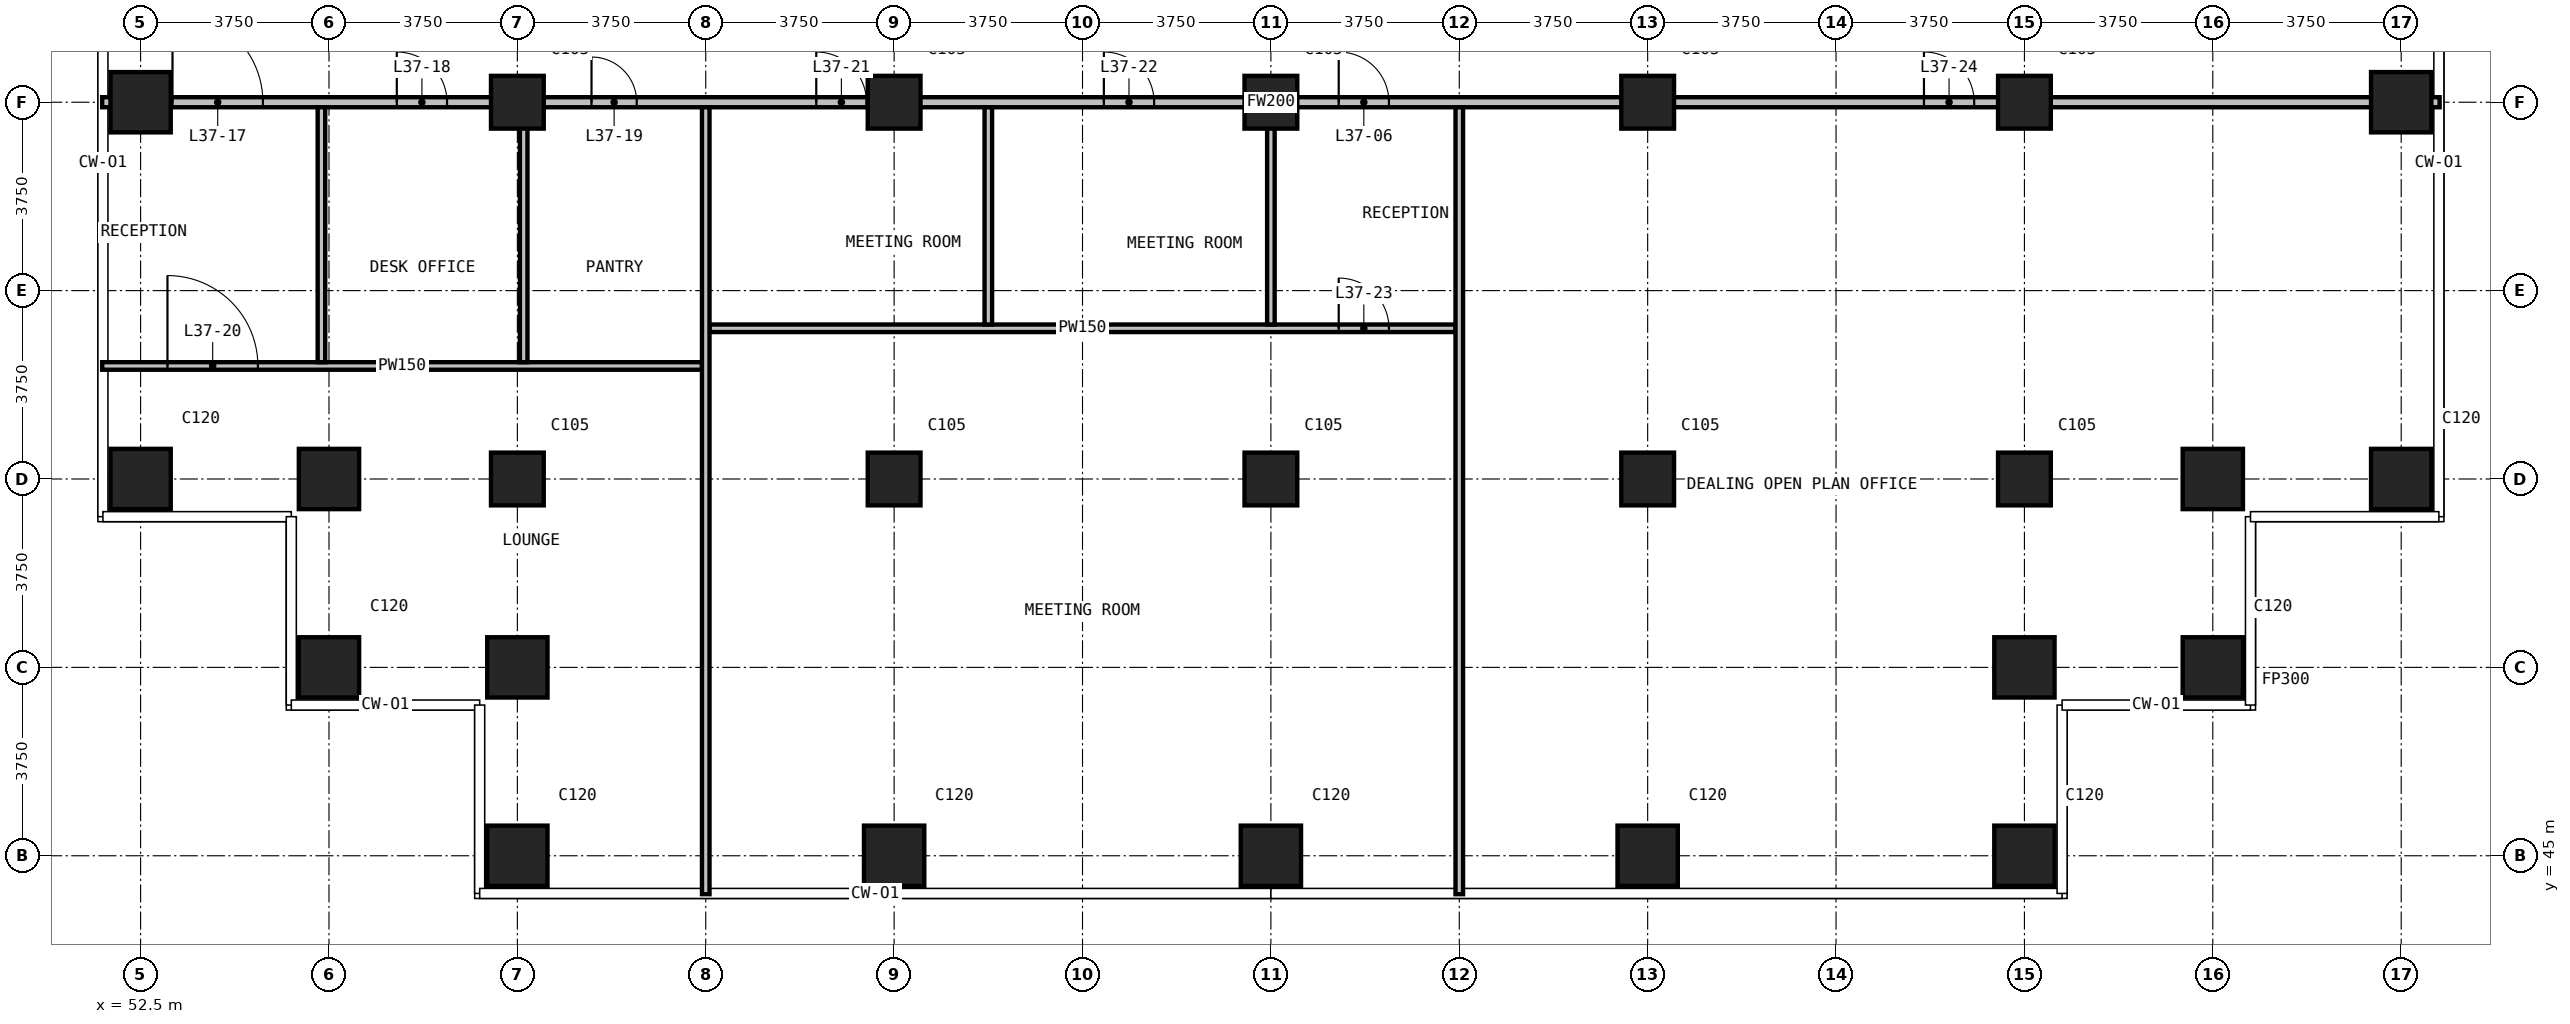
"""IFC4 building model, lengths in metres.
Left out: names, types, materials, properties, quantities, classifications, styles, units other than length and angle.
Written with IfcOpenShell. Run it as: python <this file> out.ifc"""

import sys

from ifc_helpers import new_model, si_unit, direction, frame, frame_2d, origin, origin_2d, place, context, subcontext, project, spatial, rectangle, extrude, element, fill, save


model = new_model("IFC4")
c1 = context("Model", 3, precision=1e-05, world=origin(), true_north=direction((0.0, 1.0)))
c2 = subcontext(c1, "Body", "Model", "MODEL_VIEW")
j1 = project(units=[si_unit("LENGTHUNIT", "METRE"), si_unit("PLANEANGLEUNIT", "RADIAN")], contexts=[c1])
p1 = place(None, origin())
s1 = spatial("IfcSite", under=j1, at=p1, CompositionType="ELEMENT")
p2 = place(p1, origin())
s2 = spatial("IfcBuilding", under=s1, at=p2, CompositionType="ELEMENT")
p3 = place(p2, frame((0.0, 0.0, 147.7)))
s3 = spatial("IfcBuildingStorey", under=s2, at=p3, CompositionType="ELEMENT", Elevation=147.7)
for number, where, z_axis, x_axis in (
    (1, (52.5, 52.5, 0.0), (0.0, 0.0, 1.0), (1.0, 0.0, 0.0)),
    (2, (52.5, 60.0, 0.0), (0.0, 0.0, 1.0), (1.0, 0.0, 0.0)),
    (3, (56.25, 48.75, 0.0), (0.0, 0.0, 1.0), (1.0, 0.0, 0.0)),
    (4, (56.25, 52.5, 0.0), (0.0, 0.0, 1.0), (1.0, 0.0, 0.0)),
    (5, (60.0, 45.0, 0.0), (0.0, 0.0, 1.0), (1.0, 0.0, 0.0)),
    (6, (60.0, 48.75, 0.0), (0.0, 0.0, 1.0), (1.0, 0.0, 0.0)),
):
    element("IfcColumn", number, at=place(p3, frame(where, z_axis=z_axis, x_axis=x_axis)), inside=s3, PredefinedType="COLUMN", context=c2, shape_type="SweptSolid", body=[
        extrude(rectangle(XDim=1.2, YDim=1.2, at=origin_2d()), origin(), (0.0, 0.0, 1.0), 3.6),
    ])
for number, where, z_axis, x_axis in (
    (7, (60.0, 52.5, 0.0), (0.0, 0.0, 1.0), (1.0, 0.0, 0.0)),
    (8, (60.0, 60.0, 0.0), (0.0, 0.0, 1.0), (1.0, 0.0, 0.0)),
):
    element("IfcColumn", number, at=place(p3, frame(where, z_axis=z_axis, x_axis=x_axis)), inside=s3, PredefinedType="COLUMN", context=c2, shape_type="SweptSolid", body=[
        extrude(rectangle(XDim=1.05, YDim=1.05, at=origin_2d()), origin(), (0.0, 0.0, 1.0), 3.6),
    ])
p4 = place(p3, frame((67.5, 45.0, 0.0), z_axis=(0.0, 0.0, 1.0), x_axis=(1.0, 0.0, 0.0)))
e9 = element("IfcColumn", 9, at=p4, inside=s3, PredefinedType="COLUMN", context=c2, shape_type="SweptSolid", body=[
    extrude(rectangle(XDim=1.2, YDim=1.2, at=origin_2d()), origin(), (0.0, 0.0, 1.0), 3.6),
])
for number, where, z_axis, x_axis in (
    (10, (67.5, 52.5, 0.0), (0.0, 0.0, 1.0), (1.0, 0.0, 0.0)),
    (11, (67.5, 60.0, 0.0), (0.0, 0.0, 1.0), (1.0, 0.0, 0.0)),
):
    element("IfcColumn", number, at=place(p3, frame(where, z_axis=z_axis, x_axis=x_axis)), inside=s3, PredefinedType="COLUMN", context=c2, shape_type="SweptSolid", body=[
        extrude(rectangle(XDim=1.05, YDim=1.05, at=origin_2d()), origin(), (0.0, 0.0, 1.0), 3.6),
    ])
p5 = place(p3, frame((75.0, 45.0, 0.0), z_axis=(0.0, 0.0, 1.0), x_axis=(1.0, 0.0, 0.0)))
e12 = element("IfcColumn", 12, at=p5, inside=s3, PredefinedType="COLUMN", context=c2, shape_type="SweptSolid", body=[
    extrude(rectangle(XDim=1.2, YDim=1.2, at=origin_2d()), origin(), (0.0, 0.0, 1.0), 3.6),
])
for number, where, z_axis, x_axis in (
    (13, (75.0, 52.5, 0.0), (0.0, 0.0, 1.0), (1.0, 0.0, 0.0)),
    (14, (75.0, 60.0, 0.0), (0.0, 0.0, 1.0), (1.0, 0.0, 0.0)),
):
    element("IfcColumn", number, at=place(p3, frame(where, z_axis=z_axis, x_axis=x_axis)), inside=s3, PredefinedType="COLUMN", context=c2, shape_type="SweptSolid", body=[
        extrude(rectangle(XDim=1.05, YDim=1.05, at=origin_2d()), origin(), (0.0, 0.0, 1.0), 3.6),
    ])
p6 = place(p3, frame((82.5, 45.0, 0.0), z_axis=(0.0, 0.0, 1.0), x_axis=(1.0, 0.0, 0.0)))
e15 = element("IfcColumn", 15, at=p6, inside=s3, PredefinedType="COLUMN", context=c2, shape_type="SweptSolid", body=[
    extrude(rectangle(XDim=1.2, YDim=1.2, at=origin_2d()), origin(), (0.0, 0.0, 1.0), 3.6),
])
for number, where, z_axis, x_axis in (
    (16, (82.5, 52.5, 0.0), (0.0, 0.0, 1.0), (1.0, 0.0, 0.0)),
    (17, (82.5, 60.0, 0.0), (0.0, 0.0, 1.0), (1.0, 0.0, 0.0)),
):
    element("IfcColumn", number, at=place(p3, frame(where, z_axis=z_axis, x_axis=x_axis)), inside=s3, PredefinedType="COLUMN", context=c2, shape_type="SweptSolid", body=[
        extrude(rectangle(XDim=1.05, YDim=1.05, at=origin_2d()), origin(), (0.0, 0.0, 1.0), 3.6),
    ])
for number, where, z_axis, x_axis in (
    (18, (90.0, 45.0, 0.0), (0.0, 0.0, 1.0), (1.0, 0.0, 0.0)),
    (19, (90.0, 48.75, 0.0), (0.0, 0.0, 1.0), (1.0, 0.0, 0.0)),
):
    element("IfcColumn", number, at=place(p3, frame(where, z_axis=z_axis, x_axis=x_axis)), inside=s3, PredefinedType="COLUMN", context=c2, shape_type="SweptSolid", body=[
        extrude(rectangle(XDim=1.2, YDim=1.2, at=origin_2d()), origin(), (0.0, 0.0, 1.0), 3.6),
    ])
for number, where, z_axis, x_axis in (
    (20, (90.0, 52.5, 0.0), (0.0, 0.0, 1.0), (1.0, 0.0, 0.0)),
    (21, (90.0, 60.0, 0.0), (0.0, 0.0, 1.0), (1.0, 0.0, 0.0)),
):
    element("IfcColumn", number, at=place(p3, frame(where, z_axis=z_axis, x_axis=x_axis)), inside=s3, PredefinedType="COLUMN", context=c2, shape_type="SweptSolid", body=[
        extrude(rectangle(XDim=1.05, YDim=1.05, at=origin_2d()), origin(), (0.0, 0.0, 1.0), 3.6),
    ])
for number, where, z_axis, x_axis in (
    (22, (93.75, 48.75, 0.0), (0.0, 0.0, 1.0), (1.0, 0.0, 0.0)),
    (23, (93.75, 52.5, 0.0), (0.0, 0.0, 1.0), (1.0, 0.0, 0.0)),
    (24, (97.5, 52.5, 0.0), (0.0, 0.0, 1.0), (1.0, 0.0, 0.0)),
    (25, (97.5, 60.0, 0.0), (0.0, 0.0, 1.0), (1.0, 0.0, 0.0)),
):
    element("IfcColumn", number, at=place(p3, frame(where, z_axis=z_axis, x_axis=x_axis)), inside=s3, PredefinedType="COLUMN", context=c2, shape_type="SweptSolid", body=[
        extrude(rectangle(XDim=1.2, YDim=1.2, at=origin_2d()), origin(), (0.0, 0.0, 1.0), 3.6),
    ])
p7 = place(p3, frame((51.735, 60.0, 0.0), z_axis=(0.0, 0.0, 1.0), x_axis=(1.0, 0.0, 0.0)))
e26 = element("IfcWall", 26, at=p7, inside=s3, PredefinedType="PARTITIONING", context=c2, shape_type="SweptSolid", body=[
    extrude(rectangle(XDim=46.53, YDim=0.2, at=frame_2d((23.265, 0.0))), origin(), (0.0, 0.0, 1.0), 3.3),
])
p8 = place(p7, frame((24.615, 0.0, 0.0)))
e27 = element("IfcOpeningElement", 27, at=p8, cuts=e26, PredefinedType="OPENING", context=c2, shape_type="SweptSolid", body=[
    extrude(rectangle(XDim=1.0, YDim=2.2, at=frame_2d((0.5, 1.1))), frame((0.0, 0.11, 0.0), z_axis=(0.0, -1.0, 0.0), x_axis=(1.0, 0.0, 0.0)), (0.0, 0.0, 1.0), 0.22),
])
p9 = place(p7, frame((1.4, 0.0, 0.0)))
e28 = element("IfcOpeningElement", 28, at=p9, cuts=e26, PredefinedType="OPENING", context=c2, shape_type="SweptSolid", body=[
    extrude(rectangle(XDim=1.8, YDim=2.2, at=frame_2d((0.9, 1.1))), frame((0.0, 0.11, 0.0), z_axis=(0.0, -1.0, 0.0), x_axis=(1.0, 0.0, 0.0)), (0.0, 0.0, 1.0), 0.22),
])
p10 = place(p7, frame((5.865, 0.0, 0.0)))
e29 = element("IfcOpeningElement", 29, at=p10, cuts=e26, PredefinedType="OPENING", context=c2, shape_type="SweptSolid", body=[
    extrude(rectangle(XDim=1.0, YDim=2.2, at=frame_2d((0.5, 1.1))), frame((0.0, 0.11, 0.0), z_axis=(0.0, -1.0, 0.0), x_axis=(1.0, 0.0, 0.0)), (0.0, 0.0, 1.0), 0.22),
])
p11 = place(p7, frame((9.741, 0.0, 0.0)))
e30 = element("IfcOpeningElement", 30, at=p11, cuts=e26, PredefinedType="OPENING", context=c2, shape_type="SweptSolid", body=[
    extrude(rectangle(XDim=0.9, YDim=2.2, at=frame_2d((0.45, 1.1))), frame((0.0, 0.11, 0.0), z_axis=(0.0, -1.0, 0.0), x_axis=(1.0, 0.0, 0.0)), (0.0, 0.0, 1.0), 0.22),
])
p12 = place(p7, frame((14.215, 0.0, 0.0)))
e31 = element("IfcOpeningElement", 31, at=p12, cuts=e26, PredefinedType="OPENING", context=c2, shape_type="SweptSolid", body=[
    extrude(rectangle(XDim=1.0, YDim=2.2, at=frame_2d((0.5, 1.1))), frame((0.0, 0.11, 0.0), z_axis=(0.0, -1.0, 0.0), x_axis=(1.0, 0.0, 0.0)), (0.0, 0.0, 1.0), 0.22),
])
p13 = place(p7, frame((19.94, 0.0, 0.0)))
e32 = element("IfcOpeningElement", 32, at=p13, cuts=e26, PredefinedType="OPENING", context=c2, shape_type="SweptSolid", body=[
    extrude(rectangle(XDim=1.0, YDim=2.2, at=frame_2d((0.5, 1.1))), frame((0.0, 0.11, 0.0), z_axis=(0.0, -1.0, 0.0), x_axis=(1.0, 0.0, 0.0)), (0.0, 0.0, 1.0), 0.22),
])
p14 = place(p7, frame((36.265, 0.0, 0.0)))
e33 = element("IfcOpeningElement", 33, at=p14, cuts=e26, PredefinedType="OPENING", context=c2, shape_type="SweptSolid", body=[
    extrude(rectangle(XDim=1.0, YDim=2.2, at=frame_2d((0.5, 1.1))), frame((0.0, 0.11, 0.0), z_axis=(0.0, -1.0, 0.0), x_axis=(1.0, 0.0, 0.0)), (0.0, 0.0, 1.0), 0.22),
])
p15 = place(p3, frame((51.735, 54.75, 0.0), z_axis=(0.0, 0.0, 1.0), x_axis=(1.0, 0.0, 0.0)))
e34 = element("IfcWall", 34, at=p15, inside=s3, PredefinedType="PARTITIONING", context=c2, shape_type="SweptSolid", body=[
    extrude(rectangle(XDim=11.94, YDim=0.15, at=frame_2d((5.97, 0.0))), origin(), (0.0, 0.0, 1.0), 3.3),
])
p16 = place(p15, frame((1.3, 0.0, 0.0)))
e35 = element("IfcOpeningElement", 35, at=p16, cuts=e34, PredefinedType="OPENING", context=c2, shape_type="SweptSolid", body=[
    extrude(rectangle(XDim=1.8, YDim=2.2, at=frame_2d((0.9, 1.1))), frame((0.0, 0.085, 0.0), z_axis=(0.0, -1.0, 0.0), x_axis=(1.0, 0.0, 0.0)), (0.0, 0.0, 1.0), 0.17),
])
p17 = place(p3, frame((63.825, 55.5, 0.0), z_axis=(0.0, 0.0, 1.0), x_axis=(1.0, 0.0, 0.0)))
e36 = element("IfcWall", 36, at=p17, inside=s3, PredefinedType="PARTITIONING", context=c2, shape_type="SweptSolid", body=[
    extrude(rectangle(XDim=14.85, YDim=0.15, at=frame_2d((7.425, 0.0))), origin(), (0.0, 0.0, 1.0), 3.3),
])
p18 = place(p17, frame((12.525, 0.0, 0.0)))
e37 = element("IfcOpeningElement", 37, at=p18, cuts=e36, PredefinedType="OPENING", context=c2, shape_type="SweptSolid", body=[
    extrude(rectangle(XDim=1.0, YDim=2.2, at=frame_2d((0.5, 1.1))), frame((0.0, 0.085, 0.0), z_axis=(0.0, -1.0, 0.0), x_axis=(1.0, 0.0, 0.0)), (0.0, 0.0, 1.0), 0.17),
])
for number, where, z_axis, x_axis in (
    (38, (56.1, 54.825, 0.0), (0.0, 0.0, 1.0), (0.0, 1.0, 0.0)),
    (39, (60.126, 54.825, 0.0), (0.0, 0.0, 1.0), (0.0, 1.0, 0.0)),
):
    element("IfcWall", number, at=place(p3, frame(where, z_axis=z_axis, x_axis=x_axis)), inside=s3, PredefinedType="PARTITIONING", context=c2, shape_type="SweptSolid", body=[
        extrude(rectangle(XDim=5.075, YDim=0.15, at=frame_2d((2.538, 0.0))), origin(), (0.0, 0.0, 1.0), 3.3),
    ])
p19 = place(p3, frame((63.75, 44.235, 0.0), z_axis=(0.0, 0.0, 1.0), x_axis=(0.0, 1.0, 0.0)))
e40 = element("IfcWall", 40, at=p19, inside=s3, PredefinedType="PARTITIONING", context=c2, shape_type="SweptSolid", body=[
    extrude(rectangle(XDim=15.665, YDim=0.15, at=frame_2d((7.833, 0.0))), origin(), (0.0, 0.0, 1.0), 3.3),
])
for number, where, z_axis, x_axis in (
    (41, (69.375, 55.575, 0.0), (0.0, 0.0, 1.0), (0.0, 1.0, 0.0)),
    (42, (75.0, 55.575, 0.0), (0.0, 0.0, 1.0), (0.0, 1.0, 0.0)),
):
    element("IfcWall", number, at=place(p3, frame(where, z_axis=z_axis, x_axis=x_axis)), inside=s3, PredefinedType="PARTITIONING", context=c2, shape_type="SweptSolid", body=[
        extrude(rectangle(XDim=4.325, YDim=0.15, at=frame_2d((2.163, 0.0))), origin(), (0.0, 0.0, 1.0), 3.3),
    ])
p20 = place(p3, frame((78.75, 44.235, 0.0), z_axis=(0.0, 0.0, 1.0), x_axis=(0.0, 1.0, 0.0)))
e43 = element("IfcWall", 43, at=p20, inside=s3, PredefinedType="PARTITIONING", context=c2, shape_type="SweptSolid", body=[
    extrude(rectangle(XDim=15.665, YDim=0.15, at=frame_2d((7.833, 0.0))), origin(), (0.0, 0.0, 1.0), 3.3),
])
p21 = place(p8, origin())
e44 = element("IfcDoor", 44, at=p21, inside=s3, OperationType="SINGLE_SWING_RIGHT", PredefinedType="DOOR", context=c2, shape_type="SweptSolid", body=[
    extrude(rectangle(XDim=1.0, YDim=2.2, at=frame_2d((0.5, 1.1))), frame((0.0, 0.025, 0.0), z_axis=(0.0, -1.0, 0.0), x_axis=(1.0, 0.0, 0.0)), (0.0, 0.0, 1.0), 0.05),
])
fill(e27, e44)
p22 = place(p9, origin())
e45 = element("IfcDoor", 45, at=p22, inside=s3, OperationType="DOUBLE_DOOR_SINGLE_SWING", PredefinedType="DOOR", context=c2, shape_type="SweptSolid", body=[
    extrude(rectangle(XDim=1.8, YDim=2.2, at=frame_2d((0.9, 1.1))), frame((0.0, 0.025, 0.0), z_axis=(0.0, -1.0, 0.0), x_axis=(1.0, 0.0, 0.0)), (0.0, 0.0, 1.0), 0.05),
])
fill(e28, e45)
p23 = place(p10, origin())
e46 = element("IfcDoor", 46, at=p23, inside=s3, OperationType="SINGLE_SWING_RIGHT", PredefinedType="DOOR", context=c2, shape_type="SweptSolid", body=[
    extrude(rectangle(XDim=1.0, YDim=2.2, at=frame_2d((0.5, 1.1))), frame((0.0, 0.025, 0.0), z_axis=(0.0, -1.0, 0.0), x_axis=(1.0, 0.0, 0.0)), (0.0, 0.0, 1.0), 0.05),
])
fill(e29, e46)
p24 = place(p11, origin())
e47 = element("IfcDoor", 47, at=p24, inside=s3, OperationType="SINGLE_SWING_RIGHT", PredefinedType="DOOR", context=c2, shape_type="SweptSolid", body=[
    extrude(rectangle(XDim=0.9, YDim=2.2, at=frame_2d((0.45, 1.1))), frame((0.0, 0.025, 0.0), z_axis=(0.0, -1.0, 0.0), x_axis=(1.0, 0.0, 0.0)), (0.0, 0.0, 1.0), 0.05),
])
fill(e30, e47)
p25 = place(p16, origin())
e48 = element("IfcDoor", 48, at=p25, inside=s3, OperationType="DOUBLE_DOOR_SINGLE_SWING", PredefinedType="DOOR", context=c2, shape_type="SweptSolid", body=[
    extrude(rectangle(XDim=1.8, YDim=2.2, at=frame_2d((0.9, 1.1))), frame((0.0, 0.025, 0.0), z_axis=(0.0, -1.0, 0.0), x_axis=(1.0, 0.0, 0.0)), (0.0, 0.0, 1.0), 0.05),
])
fill(e35, e48)
p26 = place(p12, origin())
e49 = element("IfcDoor", 49, at=p26, inside=s3, OperationType="SINGLE_SWING_LEFT", PredefinedType="DOOR", context=c2, shape_type="SweptSolid", body=[
    extrude(rectangle(XDim=1.0, YDim=2.2, at=frame_2d((0.5, 1.1))), frame((0.0, 0.025, 0.0), z_axis=(0.0, -1.0, 0.0), x_axis=(1.0, 0.0, 0.0)), (0.0, 0.0, 1.0), 0.05),
])
fill(e31, e49)
p27 = place(p13, origin())
e50 = element("IfcDoor", 50, at=p27, inside=s3, OperationType="SINGLE_SWING_LEFT", PredefinedType="DOOR", context=c2, shape_type="SweptSolid", body=[
    extrude(rectangle(XDim=1.0, YDim=2.2, at=frame_2d((0.5, 1.1))), frame((0.0, 0.025, 0.0), z_axis=(0.0, -1.0, 0.0), x_axis=(1.0, 0.0, 0.0)), (0.0, 0.0, 1.0), 0.05),
])
fill(e32, e50)
p28 = place(p18, origin())
e51 = element("IfcDoor", 51, at=p28, inside=s3, OperationType="SINGLE_SWING_LEFT", PredefinedType="DOOR", context=c2, shape_type="SweptSolid", body=[
    extrude(rectangle(XDim=1.0, YDim=2.2, at=frame_2d((0.5, 1.1))), frame((0.0, 0.025, 0.0), z_axis=(0.0, -1.0, 0.0), x_axis=(1.0, 0.0, 0.0)), (0.0, 0.0, 1.0), 0.05),
])
fill(e37, e51)
p29 = place(p14, origin())
e52 = element("IfcDoor", 52, at=p29, inside=s3, OperationType="SINGLE_SWING_RIGHT", PredefinedType="DOOR", context=c2, shape_type="SweptSolid", body=[
    extrude(rectangle(XDim=1.0, YDim=2.2, at=frame_2d((0.5, 1.1))), frame((0.0, 0.025, 0.0), z_axis=(0.0, -1.0, 0.0), x_axis=(1.0, 0.0, 0.0)), (0.0, 0.0, 1.0), 0.05),
])
fill(e33, e52)
save(model, sys.argv[1])
